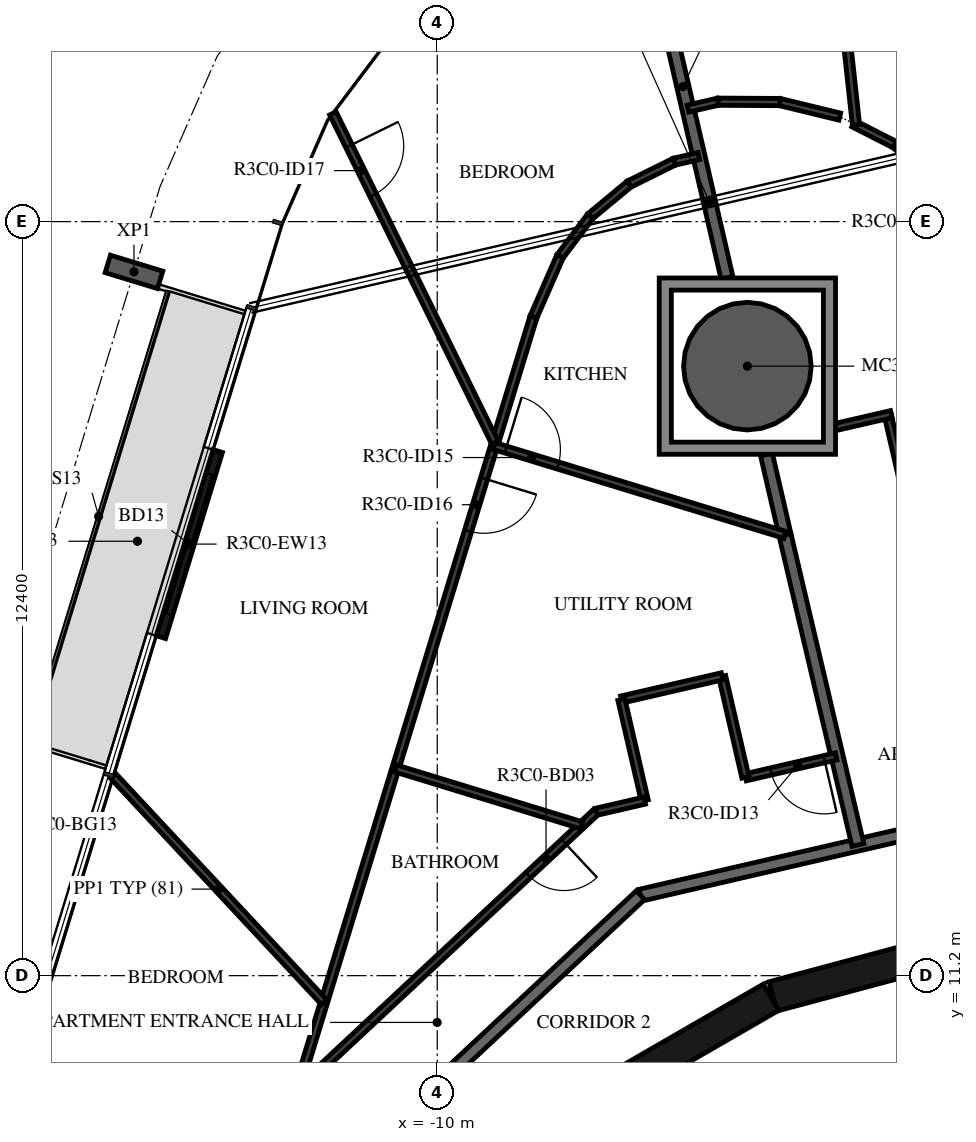
"""IFC4 building model, lengths in metres.
Left out: names, types, materials, properties, quantities, classifications, styles, units other than length and angle.
Written with IfcOpenShell. Run it as: python <this file> out.ifc"""

import sys

from ifc_helpers import new_model, si_unit, direction, frame, frame_2d, origin, origin_2d, place, context, subcontext, project, spatial, polyline, rectangle, hollow_circle, i_section, outline, extrude, element, fill, save


model = new_model("IFC4")
c1 = context("Model", 3, precision=1e-05, world=origin(), true_north=direction((0.0, 1.0)))
c2 = subcontext(c1, "Body", "Model", "MODEL_VIEW")
j1 = project(units=[si_unit("LENGTHUNIT", "METRE"), si_unit("PLANEANGLEUNIT", "RADIAN")], contexts=[c1])
p1 = place(None, origin())
s1 = spatial("IfcSite", under=j1, at=p1, CompositionType="ELEMENT")
p2 = place(p1, origin())
s2 = spatial("IfcBuilding", under=s1, at=p2, CompositionType="ELEMENT")
p3 = place(p2, frame((0.0, 0.0, 134.4)))
s3 = spatial("IfcBuildingStorey", under=s2, at=p3, CompositionType="ELEMENT", Elevation=134.4)
p4 = place(p3, frame((-4.9, 21.223, -0.38), z_axis=(0.0, 0.0, 1.0), x_axis=(1.0, 0.0, 0.0)))
e1 = element("IfcColumn", 1, at=p4, inside=s3, PredefinedType="COLUMN", context=c2, shape_type="SweptSolid", body=[
    extrude(hollow_circle(Radius=1.05, WallThickness=0.05, at=origin_2d()), origin(), (0.0, 0.0, 1.0), 3.5),
])
p5 = place(p3, frame((-14.987, 22.773, -0.38), z_axis=(0.0, 0.0, 1.0), x_axis=(0.29237190653, 0.956304694264, 0.0)))
e2 = element("IfcColumn", 2, at=p5, inside=s3, PredefinedType="COLUMN", context=c2, shape_type="SweptSolid", body=[
    extrude(i_section(OverallWidth=0.3, OverallDepth=0.9, WebThickness=0.019, FlangeThickness=0.035, FilletRadius=0.03, at=origin_2d()), origin(), (0.0, 0.0, 1.0), 3.5),
])
p6 = place(p3, frame((-13.609, 19.827, 0.0), z_axis=(0.0, 0.0, 1.0), x_axis=(-0.292348395078, -0.956311882126, 0.0)))
e3 = element("IfcWall", 3, at=p6, inside=s3, PredefinedType="STANDARD", context=c2, shape_type="SweptSolid", body=[
    extrude(rectangle(XDim=3.2, YDim=0.16, at=frame_2d((1.6, 0.0))), origin(), (0.0, 0.0, 1.0), 3.12),
])
p7 = place(p6, frame((0.4, 0.0, 0.0)))
e4 = element("IfcOpeningElement", 4, at=p7, cuts=e3, PredefinedType="OPENING", context=c2, shape_type="SweptSolid", body=[
    extrude(rectangle(XDim=2.4, YDim=2.4, at=frame_2d((1.2, 1.2))), frame((0.0, 0.09, 0.0), z_axis=(0.0, -1.0, 0.0), x_axis=(1.0, 0.0, 0.0)), (0.0, 0.0, 1.0), 0.18),
])
for number, where, z_axis, x_axis in (
    (5, (-1.55, 11.643, 0.0), (0.0, 0.0, 1.0), (-0.966, -0.259, 0.0)),
    (6, (-4.51, 10.845, 0.0), (0.0, 0.0, 1.0), (-0.866, -0.5, 0.0)),
):
    element("IfcWall", number, at=place(p3, frame(where, z_axis=z_axis, x_axis=x_axis)), inside=s3, PredefinedType="SHEAR", context=c2, shape_type="SweptSolid", body=[
        extrude(rectangle(XDim=3.033, YDim=0.5, at=frame_2d((1.516, 0.0))), origin(), (0.0, 0.0, 1.0), 3.12),
    ])
p8 = place(p3, frame((0.495, 14.175, 0.0), z_axis=(0.0, 0.0, 1.0), x_axis=(-0.974376622151, -0.224922649383, 0.0)))
e7 = element("IfcWall", 7, at=p8, inside=s3, PredefinedType="STANDARD", context=c2, shape_type="SweptSolid", body=[
    extrude(rectangle(XDim=7.342, YDim=0.2, at=frame_2d((3.671, 0.0))), origin(), (0.0, 0.0, 1.0), 3.12),
])
p9 = place(p3, frame((-6.659, 12.523, 0.0), z_axis=(0.0, 0.0, 1.0), x_axis=(-0.731350455479, -0.682001841105, 0.0)))
e8 = element("IfcWall", 8, at=p9, inside=s3, PredefinedType="STANDARD", context=c2, shape_type="SweptSolid", body=[
    extrude(rectangle(XDim=7.342, YDim=0.2, at=frame_2d((3.671, 0.0))), origin(), (0.0, 0.0, 1.0), 3.12),
])
p10 = place(p9, frame((4.2, 0.0, 0.0)))
e9 = element("IfcOpeningElement", 9, at=p10, cuts=e8, PredefinedType="OPENING", context=c2, shape_type="SweptSolid", body=[
    extrude(rectangle(XDim=1.0, YDim=2.1, at=frame_2d((0.5, 1.05))), frame((0.0, 0.11, 0.0), z_axis=(0.0, -1.0, 0.0), x_axis=(1.0, 0.0, 0.0)), (0.0, 0.0, 1.0), 0.22),
])
p11 = place(p3, frame((-4.281, 18.448, 0.0), z_axis=(0.0, 0.0, 1.0), x_axis=(0.228867856942, -0.973457499873, 0.0)))
e10 = element("IfcWall", 10, at=p11, inside=s3, PredefinedType="STANDARD", context=c2, shape_type="SweptSolid", body=[
    extrude(rectangle(XDim=5.238, YDim=0.2, at=frame_2d((2.619, 0.0))), origin(), (0.0, 0.0, 1.0), 3.12),
])
p12 = place(p3, frame((-4.586, 19.771, 0.0), z_axis=(0.0, 0.0, 1.0), x_axis=(0.224898895484, -0.974382105136, 0.0)))
e11 = element("IfcWall", 11, at=p12, inside=s3, PredefinedType="STANDARD", context=c2, shape_type="SweptSolid", body=[
    extrude(rectangle(XDim=1.358, YDim=0.2, at=frame_2d((0.679, 0.0))), origin(), (0.0, 0.0, 1.0), 3.12),
])
p13 = place(p3, frame((-6.687, 28.966, 0.0), z_axis=(0.0, 0.0, 1.0), x_axis=(0.224945100086, -0.974371439415, 0.0)))
e12 = element("IfcWall", 12, at=p13, inside=s3, PredefinedType="STANDARD", context=c2, shape_type="SweptSolid", body=[
    extrude(rectangle(XDim=6.458, YDim=0.2, at=frame_2d((3.229, 0.0))), origin(), (0.0, 0.0, 1.0), 3.12),
])
p14 = place(p3, frame((-1.404, 15.276, 0.0), z_axis=(0.0, 0.0, 1.0), x_axis=(-0.224947305813, 0.974370930194, 0.0)))
e13 = element("IfcWall", 13, at=p14, inside=s3, PredefinedType="PARTITIONING", context=c2, shape_type="SweptSolid", body=[
    extrude(rectangle(XDim=5.28, YDim=0.12, at=frame_2d((2.64, 0.0))), origin(), (0.0, 0.0, 1.0), 3.12),
])
p15 = place(p3, frame((-2.533, 20.434, 0.0), z_axis=(0.0, 0.0, 1.0), x_axis=(-0.974387124574, -0.224877147491, 0.0)))
e14 = element("IfcWall", 14, at=p15, inside=s3, PredefinedType="PARTITIONING", context=c2, shape_type="SweptSolid", body=[
    extrude(rectangle(XDim=1.011, YDim=0.12, at=frame_2d((0.505, 0.0))), origin(), (0.0, 0.0, 1.0), 3.12),
])
p16 = place(p3, frame((-3.156, 25.212, 0.0), z_axis=(0.0, 0.0, 1.0), x_axis=(0.890954246936, -0.454093085025, 0.0)))
e15 = element("IfcWall", 15, at=p16, inside=s3, PredefinedType="PARTITIONING", context=c2, shape_type="SweptSolid", body=[
    extrude(rectangle(XDim=0.765, YDim=0.12, at=frame_2d((0.383, 0.0))), origin(), (0.0, 0.0, 1.0), 3.12),
])
p17 = place(p3, frame((-2.474, 24.865, 0.0), z_axis=(0.0, 0.0, 1.0), x_axis=(0.762351487461, -0.647163201647, 0.0)))
e16 = element("IfcWall", 16, at=p17, inside=s3, PredefinedType="PARTITIONING", context=c2, shape_type="SweptSolid", body=[
    extrude(rectangle(XDim=1.227, YDim=0.12, at=frame_2d((0.614, 0.0))), origin(), (0.0, 0.0, 1.0), 3.12),
])
p18 = place(p3, frame((-3.538, 29.07, 0.0), z_axis=(0.0, 0.0, 1.0), x_axis=(0.1087420482, -0.994070001033, 0.0)))
e17 = element("IfcWall", 17, at=p18, inside=s3, PredefinedType="PARTITIONING", context=c2, shape_type="SweptSolid", body=[
    extrude(rectangle(XDim=3.902, YDim=0.12, at=frame_2d((1.951, 0.0))), origin(), (0.0, 0.0, 1.0), 3.12),
])
p19 = place(p18, frame((0.2, 0.0, 0.0)))
e18 = element("IfcOpeningElement", 18, at=p19, cuts=e17, PredefinedType="OPENING", context=c2, shape_type="SweptSolid", body=[
    extrude(rectangle(XDim=0.9, YDim=2.1, at=frame_2d((0.45, 1.05))), frame((0.0, 0.07, 0.0), z_axis=(0.0, -1.0, 0.0), x_axis=(1.0, 0.0, 0.0)), (0.0, 0.0, 1.0), 0.14),
])
p20 = place(p3, frame((-3.379, 25.326, 0.0), z_axis=(0.0, 0.0, 1.0), x_axis=(-0.971704876381, 0.236198292157, 0.0)))
e19 = element("IfcWall", 19, at=p20, inside=s3, PredefinedType="PARTITIONING", context=c2, shape_type="SweptSolid", body=[
    extrude(rectangle(XDim=1.016, YDim=0.12, at=frame_2d((0.508, 0.0))), origin(), (0.0, 0.0, 1.0), 3.12),
])
p21 = place(p3, frame((-4.367, 25.566, 0.0), z_axis=(0.0, 0.0, 1.0), x_axis=(-0.999983366401, 0.005767748328, 0.0)))
e20 = element("IfcWall", 20, at=p21, inside=s3, PredefinedType="PARTITIONING", context=c2, shape_type="SweptSolid", body=[
    extrude(rectangle(XDim=1.016, YDim=0.12, at=frame_2d((0.508, 0.0))), origin(), (0.0, 0.0, 1.0), 3.12),
])
p22 = place(p3, frame((-5.383, 25.572, 0.0), z_axis=(0.0, 0.0, 1.0), x_axis=(-0.974366885246, -0.224964825997, 0.0)))
e21 = element("IfcWall", 21, at=p22, inside=s3, PredefinedType="PARTITIONING", context=c2, shape_type="SweptSolid", body=[
    extrude(rectangle(XDim=0.508, YDim=0.12, at=frame_2d((0.254, 0.0))), origin(), (0.0, 0.0, 1.0), 3.12),
])
p23 = place(p3, frame((-3.44, 14.806, 0.0), z_axis=(0.0, 0.0, 1.0), x_axis=(-0.974356244071, -0.225010910046, 0.0)))
e22 = element("IfcWall", 22, at=p23, inside=s3, PredefinedType="PARTITIONING", context=c2, shape_type="SweptSolid", body=[
    extrude(rectangle(XDim=1.531, YDim=0.12, at=frame_2d((0.766, 0.0))), origin(), (0.0, 0.0, 1.0), 3.12),
])
p24 = place(p23, frame((0.2, 0.0, 0.0)))
e23 = element("IfcOpeningElement", 23, at=p24, cuts=e22, PredefinedType="OPENING", context=c2, shape_type="SweptSolid", body=[
    extrude(rectangle(XDim=0.9, YDim=2.1, at=frame_2d((0.45, 1.05))), frame((0.0, 0.07, 0.0), z_axis=(0.0, -1.0, 0.0), x_axis=(1.0, 0.0, 0.0)), (0.0, 0.0, 1.0), 0.14),
])
p25 = place(p3, frame((-4.931, 14.461, 0.0), z_axis=(0.0, 0.0, 1.0), x_axis=(-0.224911785629, 0.974379129849, 0.0)))
e24 = element("IfcWall", 24, at=p25, inside=s3, PredefinedType="PARTITIONING", context=c2, shape_type="SweptSolid", body=[
    extrude(rectangle(XDim=1.705, YDim=0.12, at=frame_2d((0.853, 0.0))), origin(), (0.0, 0.0, 1.0), 3.12),
])
p26 = place(p3, frame((-5.315, 16.123, 0.0), z_axis=(0.0, 0.0, 1.0), x_axis=(-0.974352456598, -0.225027310168, 0.0)))
e25 = element("IfcWall", 25, at=p26, inside=s3, PredefinedType="PARTITIONING", context=c2, shape_type="SweptSolid", body=[
    extrude(rectangle(XDim=1.7, YDim=0.12, at=frame_2d((0.85, 0.0))), origin(), (0.0, 0.0, 1.0), 3.12),
])
p27 = place(p3, frame((-6.971, 15.74, 0.0), z_axis=(0.0, 0.0, 1.0), x_axis=(0.224943164347, -0.974371886301, 0.0)))
e26 = element("IfcWall", 26, at=p27, inside=s3, PredefinedType="PARTITIONING", context=c2, shape_type="SweptSolid", body=[
    extrude(rectangle(XDim=1.705, YDim=0.12, at=frame_2d((0.853, 0.0))), origin(), (0.0, 0.0, 1.0), 3.12),
])
p28 = place(p3, frame((-6.588, 14.079, 0.0), z_axis=(0.0, 0.0, 1.0), x_axis=(-0.974391195695, -0.224859506699, 0.0)))
e27 = element("IfcWall", 27, at=p28, inside=s3, PredefinedType="PARTITIONING", context=c2, shape_type="SweptSolid", body=[
    extrude(rectangle(XDim=0.821, YDim=0.12, at=frame_2d((0.41, 0.0))), origin(), (0.0, 0.0, 1.0), 3.12),
])
p29 = place(p3, frame((-7.388, 13.894, 0.0), z_axis=(0.0, 0.0, 1.0), x_axis=(-0.731357186721, -0.681994622729, 0.0)))
e28 = element("IfcWall", 28, at=p29, inside=s3, PredefinedType="PARTITIONING", context=c2, shape_type="SweptSolid", body=[
    extrude(rectangle(XDim=8.146, YDim=0.12, at=frame_2d((4.073, 0.0))), origin(), (0.0, 0.0, 1.0), 3.12),
])
p30 = place(p29, frame((0.725, 0.0, 0.0)))
e29 = element("IfcOpeningElement", 29, at=p30, cuts=e28, PredefinedType="OPENING", context=c2, shape_type="SweptSolid", body=[
    extrude(rectangle(XDim=0.8, YDim=2.1, at=frame_2d((0.4, 1.05))), frame((0.0, 0.07, 0.0), z_axis=(0.0, -1.0, 0.0), x_axis=(1.0, 0.0, 0.0)), (0.0, 0.0, 1.0), 0.14),
])
p31 = place(p29, frame((6.927, 0.0, 0.0)))
e30 = element("IfcOpeningElement", 30, at=p31, cuts=e28, PredefinedType="OPENING", context=c2, shape_type="SweptSolid", body=[
    extrude(rectangle(XDim=0.9, YDim=2.1, at=frame_2d((0.45, 1.05))), frame((0.0, 0.07, 0.0), z_axis=(0.0, -1.0, 0.0), x_axis=(1.0, 0.0, 0.0)), (0.0, 0.0, 1.0), 0.14),
])
p32 = place(p3, frame((-5.698, 24.679, 0.0), z_axis=(0.0, 0.0, 1.0), x_axis=(-0.974222160042, -0.225590742017, 0.0)))
e31 = element("IfcWall", 31, at=p32, inside=s3, PredefinedType="PARTITIONING", context=c2, shape_type="SweptSolid", body=[
    extrude(rectangle(XDim=0.415, YDim=0.12, at=frame_2d((0.207, 0.0))), origin(), (0.0, 0.0, 1.0), 3.12),
])
p33 = place(p3, frame((-6.101, 24.585, 0.0), z_axis=(0.0, 0.0, 1.0), x_axis=(-0.896362871824, -0.443321104862, 0.0)))
e32 = element("IfcWall", 32, at=p33, inside=s3, PredefinedType="PARTITIONING", context=c2, shape_type="SweptSolid", body=[
    extrude(rectangle(XDim=0.829, YDim=0.12, at=frame_2d((0.415, 0.0))), origin(), (0.0, 0.0, 1.0), 3.12),
])
p34 = place(p3, frame((-6.844, 24.218, 0.0), z_axis=(0.0, 0.0, 1.0), x_axis=(-0.769715611418, -0.63838693403, 0.0)))
e33 = element("IfcWall", 33, at=p34, inside=s3, PredefinedType="PARTITIONING", context=c2, shape_type="SweptSolid", body=[
    extrude(rectangle(XDim=0.829, YDim=0.12, at=frame_2d((0.415, 0.0))), origin(), (0.0, 0.0, 1.0), 3.12),
])
p35 = place(p3, frame((-7.482, 23.688, 0.0), z_axis=(0.0, 0.0, 1.0), x_axis=(-0.601836624867, -0.798619231529, 0.0)))
e34 = element("IfcWall", 34, at=p35, inside=s3, PredefinedType="PARTITIONING", context=c2, shape_type="SweptSolid", body=[
    extrude(rectangle(XDim=0.829, YDim=0.12, at=frame_2d((0.415, 0.0))), origin(), (0.0, 0.0, 1.0), 3.12),
])
p36 = place(p3, frame((-7.981, 23.027, 0.0), z_axis=(0.0, 0.0, 1.0), x_axis=(-0.401360750198, -0.915920055573, 0.0)))
e35 = element("IfcWall", 35, at=p36, inside=s3, PredefinedType="PARTITIONING", context=c2, shape_type="SweptSolid", body=[
    extrude(rectangle(XDim=1.087, YDim=0.12, at=frame_2d((0.543, 0.0))), origin(), (0.0, 0.0, 1.0), 3.12),
])
p37 = place(p3, frame((-8.417, 22.031, 0.0), z_axis=(0.0, 0.0, 1.0), x_axis=(-0.292371891841, -0.956304698755, 0.0)))
e36 = element("IfcWall", 36, at=p37, inside=s3, PredefinedType="PARTITIONING", context=c2, shape_type="SweptSolid", body=[
    extrude(rectangle(XDim=13.306, YDim=0.12, at=frame_2d((6.653, 0.0))), origin(), (0.0, 0.0, 1.0), 3.12),
])
p38 = place(p37, frame((2.777, 0.0, 0.0)))
e37 = element("IfcOpeningElement", 37, at=p38, cuts=e36, PredefinedType="OPENING", context=c2, shape_type="SweptSolid", body=[
    extrude(rectangle(XDim=0.9, YDim=2.1, at=frame_2d((0.45, 1.05))), frame((0.0, 0.07, 0.0), z_axis=(0.0, -1.0, 0.0), x_axis=(1.0, 0.0, 0.0)), (0.0, 0.0, 1.0), 0.14),
])
p39 = place(p3, frame((-9.066, 19.91, 0.0), z_axis=(0.0, 0.0, 1.0), x_axis=(0.956313309797, -0.292343724928, 0.0)))
e38 = element("IfcWall", 38, at=p39, inside=s3, PredefinedType="PARTITIONING", context=c2, shape_type="SweptSolid", body=[
    extrude(rectangle(XDim=5.004, YDim=0.12, at=frame_2d((2.502, 0.0))), origin(), (0.0, 0.0, 1.0), 3.12),
])
p40 = place(p39, frame((0.2, 0.0, 0.0)))
e39 = element("IfcOpeningElement", 39, at=p40, cuts=e38, PredefinedType="OPENING", context=c2, shape_type="SweptSolid", body=[
    extrude(rectangle(XDim=0.9, YDim=2.1, at=frame_2d((0.45, 1.05))), frame((0.0, 0.07, 0.0), z_axis=(0.0, -1.0, 0.0), x_axis=(1.0, 0.0, 0.0)), (0.0, 0.0, 1.0), 0.14),
])
p41 = place(p3, frame((-11.716, 25.381, 0.0), z_axis=(0.0, 0.0, 1.0), x_axis=(0.441576881221, -0.897223415862, 0.0)))
e40 = element("IfcWall", 40, at=p41, inside=s3, PredefinedType="PARTITIONING", context=c2, shape_type="SweptSolid", body=[
    extrude(rectangle(XDim=6.039, YDim=0.12, at=frame_2d((3.019, 0.0))), origin(), (0.0, 0.0, 1.0), 3.12),
])
p42 = place(p41, frame((0.6, 0.0, 0.0)))
e41 = element("IfcOpeningElement", 41, at=p42, cuts=e40, PredefinedType="OPENING", context=c2, shape_type="SweptSolid", body=[
    extrude(rectangle(XDim=0.9, YDim=2.1, at=frame_2d((0.45, 1.05))), frame((0.0, 0.07, 0.0), z_axis=(0.0, -1.0, 0.0), x_axis=(1.0, 0.0, 0.0)), (0.0, 0.0, 1.0), 0.14),
])
p43 = place(p3, frame((-10.687, 14.608, 0.0), z_axis=(0.0, 0.0, 1.0), x_axis=(0.956295309419, -0.292402601189, 0.0)))
e42 = element("IfcWall", 42, at=p43, inside=s3, PredefinedType="PARTITIONING", context=c2, shape_type="SweptSolid", body=[
    extrude(rectangle(XDim=3.201, YDim=0.12, at=frame_2d((1.601, 0.0))), origin(), (0.0, 0.0, 1.0), 3.12),
])
p44 = place(p3, frame((-15.327, 14.481, 0.0), z_axis=(0.0, 0.0, 1.0), x_axis=(0.68197575128, -0.731374783997, 0.0)))
e43 = element("IfcWall", 43, at=p44, inside=s3, PredefinedType="PARTITIONING", context=c2, shape_type="SweptSolid", body=[
    extrude(rectangle(XDim=5.081, YDim=0.12, at=frame_2d((2.54, 0.0))), origin(), (0.0, 0.0, 1.0), 3.12),
])
p45 = place(p3, origin())
e44 = element("IfcWall", 44, at=p45, inside=s3, PredefinedType="STANDARD", context=c2, shape_type="SweptSolid", body=[
    extrude(outline(polyline([(-3.45, 22.674), (-3.45, 19.773), (-6.35, 19.773), (-6.35, 22.674), (-3.45, 22.674)]), holes=[polyline([(-6.15, 19.973), (-3.65, 19.973), (-3.65, 22.473), (-6.15, 22.473), (-6.15, 19.973)])]), origin(), (0.0, 0.0, 1.0), 3.12),
])
p46 = place(p7, origin())
e45 = element("IfcDoor", 45, at=p46, inside=s3, OperationType="DOUBLE_DOOR_SLIDING", PredefinedType="DOOR", context=c2, shape_type="SweptSolid", body=[
    extrude(rectangle(XDim=2.4, YDim=2.4, at=frame_2d((1.2, 1.2))), frame((0.0, 0.025, 0.0), z_axis=(0.0, -1.0, 0.0), x_axis=(1.0, 0.0, 0.0)), (0.0, 0.0, 1.0), 0.05),
])
fill(e4, e45)
p47 = place(p24, origin())
e46 = element("IfcDoor", 46, at=p47, inside=s3, OperationType="SINGLE_SWING_LEFT", PredefinedType="DOOR", context=c2, shape_type="SweptSolid", body=[
    extrude(rectangle(XDim=0.9, YDim=2.1, at=frame_2d((0.45, 1.05))), frame((0.0, 0.025, 0.0), z_axis=(0.0, -1.0, 0.0), x_axis=(1.0, 0.0, 0.0)), (0.0, 0.0, 1.0), 0.05),
])
fill(e23, e46)
p48 = place(p30, origin())
e47 = element("IfcDoor", 47, at=p48, inside=s3, OperationType="SINGLE_SWING_LEFT", PredefinedType="DOOR", context=c2, shape_type="SweptSolid", body=[
    extrude(rectangle(XDim=0.8, YDim=2.1, at=frame_2d((0.4, 1.05))), frame((0.0, 0.025, 0.0), z_axis=(0.0, -1.0, 0.0), x_axis=(1.0, 0.0, 0.0)), (0.0, 0.0, 1.0), 0.05),
])
fill(e29, e47)
p49 = place(p40, origin())
e48 = element("IfcDoor", 48, at=p49, inside=s3, OperationType="SINGLE_SWING_LEFT", PredefinedType="DOOR", context=c2, shape_type="SweptSolid", body=[
    extrude(rectangle(XDim=0.9, YDim=2.1, at=frame_2d((0.45, 1.05))), frame((0.0, 0.025, 0.0), z_axis=(0.0, -1.0, 0.0), x_axis=(1.0, 0.0, 0.0)), (0.0, 0.0, 1.0), 0.05),
])
fill(e39, e48)
p50 = place(p38, origin())
e49 = element("IfcDoor", 49, at=p50, inside=s3, OperationType="SINGLE_SWING_LEFT", PredefinedType="DOOR", context=c2, shape_type="SweptSolid", body=[
    extrude(rectangle(XDim=0.9, YDim=2.1, at=frame_2d((0.45, 1.05))), frame((0.0, 0.025, 0.0), z_axis=(0.0, -1.0, 0.0), x_axis=(1.0, 0.0, 0.0)), (0.0, 0.0, 1.0), 0.05),
])
fill(e37, e49)
p51 = place(p42, origin())
e50 = element("IfcDoor", 50, at=p51, inside=s3, OperationType="SINGLE_SWING_LEFT", PredefinedType="DOOR", context=c2, shape_type="SweptSolid", body=[
    extrude(rectangle(XDim=0.9, YDim=2.1, at=frame_2d((0.45, 1.05))), frame((0.0, 0.025, 0.0), z_axis=(0.0, -1.0, 0.0), x_axis=(1.0, 0.0, 0.0)), (0.0, 0.0, 1.0), 0.05),
])
fill(e41, e50)
save(model, sys.argv[1])
